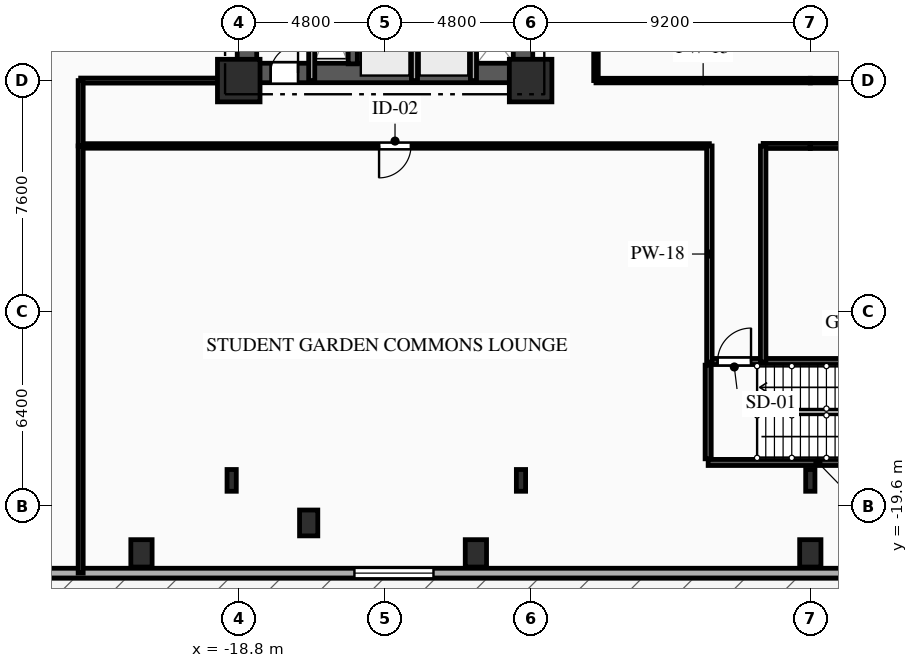
"""IFC4 building model, lengths in metres.
Left out: names, types, materials, properties, quantities, classifications, styles, units other than length and angle.
Written with IfcOpenShell. Run it as: python <this file> out.ifc"""

import sys

from ifc_helpers import new_model, si_unit, direction, frame, frame_2d, origin, origin_2d, place, context, subcontext, project, spatial, rectangle, i_section, extrude, element, fill, save


model = new_model("IFC4")
c1 = context("Model", 3, precision=1e-05, world=origin(), true_north=direction((0.0, 1.0)))
c2 = subcontext(c1, "Body", "Model", "MODEL_VIEW")
j1 = project(units=[si_unit("LENGTHUNIT", "METRE"), si_unit("PLANEANGLEUNIT", "RADIAN")], contexts=[c1])
p1 = place(None, origin())
s1 = spatial("IfcSite", under=j1, at=p1, CompositionType="ELEMENT")
p2 = place(p1, origin())
s2 = spatial("IfcBuilding", under=s1, at=p2, CompositionType="ELEMENT")
p3 = place(p2, frame((0.0, 0.0, 13.5)))
s3 = spatial("IfcBuildingStorey", under=s2, at=p3, CompositionType="ELEMENT", Elevation=13.5)
for number, where, z_axis, x_axis in (
    (1, (-18.8, -5.6, 0.0), (0.0, 0.0, 1.0), (1.0, 0.0, 0.0)),
    (2, (-9.2, -5.6, 0.0), (0.0, 0.0, 1.0), (1.0, 0.0, 0.0)),
):
    element("IfcColumn", number, at=place(p3, frame(where, z_axis=z_axis, x_axis=x_axis)), inside=s3, PredefinedType="COLUMN", context=c2, shape_type="SweptSolid", body=[
        extrude(rectangle(XDim=1.4, YDim=1.4, at=origin_2d()), origin(), (0.0, 0.0, 1.0), 4.5),
    ])
for number, where, z_axis, x_axis in (
    (3, (-22.0, -21.15, 0.0), (0.0, 0.0, 1.0), (1.0, 0.0, 0.0)),
    (4, (-11.0, -21.15, 0.0), (0.0, 0.0, 1.0), (1.0, 0.0, 0.0)),
    (5, (0.0, -21.15, 0.0), (0.0, 0.0, 1.0), (1.0, 0.0, 0.0)),
):
    element("IfcColumn", number, at=place(p3, frame(where, z_axis=z_axis, x_axis=x_axis)), inside=s3, PredefinedType="COLUMN", context=c2, shape_type="SweptSolid", body=[
        extrude(rectangle(XDim=0.7, YDim=0.9, at=origin_2d()), origin(), (0.0, 0.0, 1.0), 4.5),
    ])
p4 = place(p3, frame((-16.5, -20.15, 0.0), z_axis=(0.0, 0.0, 1.0), x_axis=(1.0, 0.0, 0.0)))
e6 = element("IfcColumn", 6, at=p4, inside=s3, PredefinedType="PILASTER", context=c2, shape_type="SweptSolid", body=[
    extrude(rectangle(XDim=0.6, YDim=0.85, at=origin_2d()), origin(), (0.0, 0.0, 1.0), 4.5),
])
for number, where, z_axis, x_axis in (
    (7, (-19.033, -18.75, 0.0), (0.0, 0.0, 1.0), (1.0, 0.0, 0.0)),
    (8, (-9.517, -18.75, 0.0), (0.0, 0.0, 1.0), (1.0, 0.0, 0.0)),
    (9, (0.0, -18.75, 0.0), (0.0, 0.0, 1.0), (1.0, 0.0, 0.0)),
):
    element("IfcColumn", number, at=place(p3, frame(where, z_axis=z_axis, x_axis=x_axis)), inside=s3, PredefinedType="COLUMN", context=c2, shape_type="SweptSolid", body=[
        extrude(i_section(OverallWidth=0.304, OverallDepth=0.716, WebThickness=0.021, FlangeThickness=0.04, FilletRadius=0.027, at=origin_2d()), origin(), (0.0, 0.0, 1.0), 4.5),
    ])
p5 = place(p3, frame((36.8, -21.8, 0.0), z_axis=(0.0, 0.0, 1.0), x_axis=(-1.0, 0.0, 0.0)))
e10 = element("IfcWall", 10, at=p5, inside=s3, PredefinedType="SOLIDWALL", context=c2, shape_type="SweptSolid", body=[
    extrude(rectangle(XDim=73.6, YDim=0.32, at=frame_2d((36.8, 0.0))), origin(), (0.0, 0.0, 1.0), 4.17),
])
p6 = place(p5, frame((0.75, 0.0, 0.0)))
e11 = element("IfcOpeningElement", 11, at=p6, cuts=e10, PredefinedType="OPENING", context=c2, shape_type="SweptSolid", body=[
    extrude(rectangle(XDim=1.5, YDim=2.2, at=frame_2d((0.75, 1.1))), frame((0.0, 0.17, 0.0), z_axis=(0.0, -1.0, 0.0), x_axis=(1.0, 0.0, 0.0)), (0.0, 0.0, 1.0), 0.34),
])
p7 = place(p5, frame((5.347, 0.0, 0.85)))
e12 = element("IfcOpeningElement", 12, at=p7, cuts=e10, PredefinedType="OPENING", context=c2, shape_type="SweptSolid", body=[
    extrude(rectangle(XDim=2.6, YDim=2.4, at=frame_2d((1.3, 1.2))), frame((0.0, 0.17, 0.0), z_axis=(0.0, -1.0, 0.0), x_axis=(1.0, 0.0, 0.0)), (0.0, 0.0, 1.0), 0.34),
])
p8 = place(p5, frame((29.293, 0.0, 0.85)))
e13 = element("IfcOpeningElement", 13, at=p8, cuts=e10, PredefinedType="OPENING", context=c2, shape_type="SweptSolid", body=[
    extrude(rectangle(XDim=2.6, YDim=2.4, at=frame_2d((1.3, 1.2))), frame((0.0, 0.17, 0.0), z_axis=(0.0, -1.0, 0.0), x_axis=(1.0, 0.0, 0.0)), (0.0, 0.0, 1.0), 0.34),
])
p9 = place(p5, frame((49.195, 0.0, 0.85)))
e14 = element("IfcOpeningElement", 14, at=p9, cuts=e10, PredefinedType="OPENING", context=c2, shape_type="SweptSolid", body=[
    extrude(rectangle(XDim=2.6, YDim=2.4, at=frame_2d((1.3, 1.2))), frame((0.0, 0.17, 0.0), z_axis=(0.0, -1.0, 0.0), x_axis=(1.0, 0.0, 0.0)), (0.0, 0.0, 1.0), 0.34),
])
p10 = place(p5, frame((65.733, 0.0, 0.85)))
e15 = element("IfcOpeningElement", 15, at=p10, cuts=e10, PredefinedType="OPENING", context=c2, shape_type="SweptSolid", body=[
    extrude(rectangle(XDim=2.6, YDim=2.4, at=frame_2d((1.3, 1.2))), frame((0.0, 0.17, 0.0), z_axis=(0.0, -1.0, 0.0), x_axis=(1.0, 0.0, 0.0)), (0.0, 0.0, 1.0), 0.34),
])
p11 = place(p3, frame((-18.8, -5.35, 0.0), z_axis=(0.0, 0.0, 1.0), x_axis=(1.0, 0.0, 0.0)))
e16 = element("IfcWall", 16, at=p11, inside=s3, PredefinedType="SHEAR", context=c2, shape_type="SweptSolid", body=[
    extrude(rectangle(XDim=9.6, YDim=0.64, at=frame_2d((4.8, 0.0))), origin(), (0.0, 0.0, 1.0), 4.17),
])
p12 = place(p11, frame((1.05, 0.0, 0.0)))
e17 = element("IfcOpeningElement", 17, at=p12, cuts=e16, PredefinedType="OPENING", context=c2, shape_type="SweptSolid", body=[
    extrude(rectangle(XDim=0.9, YDim=2.1, at=frame_2d((0.45, 1.05))), frame((0.0, 0.33, 0.0), z_axis=(0.0, -1.0, 0.0), x_axis=(1.0, 0.0, 0.0)), (0.0, 0.0, 1.0), 0.66),
])
p13 = place(p3, frame((-18.53, -5.05, 0.0), z_axis=(0.0, 0.0, 1.0), x_axis=(0.0, 1.0, 0.0)))
e18 = element("IfcWall", 18, at=p13, inside=s3, PredefinedType="SHEAR", context=c2, shape_type="SweptSolid", body=[
    extrude(rectangle(XDim=10.1, YDim=0.64, at=frame_2d((5.05, 0.0))), origin(), (0.0, 0.0, 1.0), 4.17),
])
p14 = place(p3, frame((-9.45, -5.05, 0.0), z_axis=(0.0, 0.0, 1.0), x_axis=(0.0, 1.0, 0.0)))
e19 = element("IfcWall", 19, at=p14, inside=s3, PredefinedType="SHEAR", context=c2, shape_type="SweptSolid", body=[
    extrude(rectangle(XDim=10.1, YDim=0.64, at=frame_2d((5.05, 0.0))), origin(), (0.0, 0.0, 1.0), 4.17),
])
p15 = place(p14, frame((7.15, 0.0, 0.0)))
e20 = element("IfcOpeningElement", 20, at=p15, cuts=e19, PredefinedType="OPENING", context=c2, shape_type="SweptSolid", body=[
    extrude(rectangle(XDim=0.9, YDim=2.1, at=frame_2d((0.45, 1.05))), frame((0.0, 0.33, 0.0), z_axis=(0.0, -1.0, 0.0), x_axis=(1.0, 0.0, 0.0)), (0.0, 0.0, 1.0), 0.66),
])
p16 = place(p14, frame((2.4, 0.0, 0.0)))
e21 = element("IfcOpeningElement", 21, at=p16, cuts=e19, PredefinedType="OPENING", context=c2, shape_type="SweptSolid", body=[
    extrude(rectangle(XDim=1.2, YDim=2.15, at=frame_2d((0.6, 1.075))), frame((0.0, 0.33, 0.0), z_axis=(0.0, -1.0, 0.0), x_axis=(1.0, 0.0, 0.0)), (0.0, 0.0, 1.0), 0.66),
])
p17 = place(p3, frame((-15.05, -5.05, 0.0), z_axis=(0.0, 0.0, 1.0), x_axis=(0.0, 1.0, 0.0)))
e22 = element("IfcWall", 22, at=p17, inside=s3, PredefinedType="SHEAR", context=c2, shape_type="SweptSolid", body=[
    extrude(rectangle(XDim=10.1, YDim=0.3, at=frame_2d((5.05, 0.0))), origin(), (0.0, 0.0, 1.0), 4.17),
])
p18 = place(p3, frame((-3.36, -14.84, 0.0), z_axis=(0.0, 0.0, 1.0), x_axis=(1.0, 0.0, 0.0)))
e23 = element("IfcWall", 23, at=p18, inside=s3, PredefinedType="SHEAR", context=c2, shape_type="SweptSolid", body=[
    extrude(rectangle(XDim=7.22, YDim=0.2, at=frame_2d((3.61, 0.0))), origin(), (0.0, 0.0, 1.0), 4.17),
])
p19 = place(p18, frame((0.31, 0.0, 0.0)))
e24 = element("IfcOpeningElement", 24, at=p19, cuts=e23, PredefinedType="OPENING", context=c2, shape_type="SweptSolid", body=[
    extrude(rectangle(XDim=1.1, YDim=2.15, at=frame_2d((0.55, 1.075))), frame((0.0, 0.11, 0.0), z_axis=(0.0, -1.0, 0.0), x_axis=(1.0, 0.0, 0.0)), (0.0, 0.0, 1.0), 0.22),
])
p20 = place(p3, frame((-3.36, -18.16, 0.0), z_axis=(0.0, 0.0, 1.0), x_axis=(1.0, 0.0, 0.0)))
e25 = element("IfcWall", 25, at=p20, inside=s3, PredefinedType="SHEAR", context=c2, shape_type="SweptSolid", body=[
    extrude(rectangle(XDim=7.22, YDim=0.2, at=frame_2d((3.61, 0.0))), origin(), (0.0, 0.0, 1.0), 4.17),
])
p21 = place(p3, frame((-3.36, -18.04, 0.0), z_axis=(0.0, 0.0, 1.0), x_axis=(0.0, 1.0, 0.0)))
e26 = element("IfcWall", 26, at=p21, inside=s3, PredefinedType="SHEAR", context=c2, shape_type="SweptSolid", body=[
    extrude(rectangle(XDim=3.08, YDim=0.2, at=frame_2d((1.54, 0.0))), origin(), (0.0, 0.0, 1.0), 4.17),
])
p22 = place(p3, frame((-16.4, -5.6, 0.0), z_axis=(0.0, 0.0, 1.0), x_axis=(0.0, 1.0, 0.0)))
e27 = element("IfcWall", 27, at=p22, inside=s3, PredefinedType="PARTITIONING", context=c2, shape_type="SweptSolid", body=[
    extrude(rectangle(XDim=3.49, YDim=0.2, at=frame_2d((1.745, 0.0))), origin(), (0.0, 0.0, 1.0), 4.17),
])
for number, where, z_axis, x_axis in (
    (28, (-13.02, -5.6, 0.0), (0.0, 0.0, 1.0), (0.0, 1.0, 0.0)),
    (29, (-11.08, -5.6, 0.0), (0.0, 0.0, 1.0), (0.0, 1.0, 0.0)),
):
    element("IfcWall", number, at=place(p3, frame(where, z_axis=z_axis, x_axis=x_axis)), inside=s3, PredefinedType="PARTITIONING", context=c2, shape_type="SweptSolid", body=[
        extrude(rectangle(XDim=2.25, YDim=0.2, at=frame_2d((1.125, 0.0))), origin(), (0.0, 0.0, 1.0), 4.17),
    ])
p23 = place(p3, frame((-3.32, -7.75, 0.0), z_axis=(0.0, 0.0, 1.0), x_axis=(-1.0, 0.0, 0.0)))
e30 = element("IfcWall", 30, at=p23, inside=s3, PredefinedType="PARTITIONING", context=c2, shape_type="SweptSolid", body=[
    extrude(rectangle(XDim=20.68, YDim=0.15, at=frame_2d((10.34, 0.0))), origin(), (0.0, 0.0, 1.0), 4.17),
])
p24 = place(p23, frame((9.815, 0.0, 0.0)))
e31 = element("IfcOpeningElement", 31, at=p24, cuts=e30, PredefinedType="OPENING", context=c2, shape_type="SweptSolid", body=[
    extrude(rectangle(XDim=1.05, YDim=2.15, at=frame_2d((0.525, 1.075))), frame((0.0, 0.085, 0.0), z_axis=(0.0, -1.0, 0.0), x_axis=(1.0, 0.0, 0.0)), (0.0, 0.0, 1.0), 0.17),
])
p25 = place(p3, frame((0.0, -7.75, 0.0), z_axis=(0.0, 0.0, 1.0), x_axis=(-1.0, 0.0, 0.0)))
e32 = element("IfcWall", 32, at=p25, inside=s3, PredefinedType="PARTITIONING", context=c2, shape_type="SweptSolid", body=[
    extrude(rectangle(XDim=1.55, YDim=0.165, at=frame_2d((0.775, 0.0))), origin(), (0.0, 0.0, 1.0), 4.17),
])
p26 = place(p3, frame((-24.0, -5.6, 0.0), z_axis=(0.0, 0.0, 1.0), x_axis=(1.0, 0.0, 0.0)))
e33 = element("IfcWall", 33, at=p26, inside=s3, PredefinedType="PARTITIONING", context=c2, shape_type="SweptSolid", body=[
    extrude(rectangle(XDim=5.2, YDim=0.165, at=frame_2d((2.6, 0.0))), origin(), (0.0, 0.0, 1.0), 4.17),
])
p27 = place(p3, frame((-24.0, -7.75, 0.0), z_axis=(0.0, 0.0, 1.0), x_axis=(0.0, 1.0, 0.0)))
e34 = element("IfcWall", 34, at=p27, inside=s3, PredefinedType="PARTITIONING", context=c2, shape_type="SweptSolid", body=[
    extrude(rectangle(XDim=2.15, YDim=0.165, at=frame_2d((1.075, 0.0))), origin(), (0.0, 0.0, 1.0), 4.17),
])
p28 = place(p3, frame((-7.05, -5.6, 0.0), z_axis=(0.0, 0.0, 1.0), x_axis=(1.0, 0.0, 0.0)))
e35 = element("IfcWall", 35, at=p28, inside=s3, PredefinedType="PARTITIONING", context=c2, shape_type="SweptSolid", body=[
    extrude(rectangle(XDim=7.05, YDim=0.15, at=frame_2d((3.525, 0.0))), origin(), (0.0, 0.0, 1.0), 3.655),
])
p29 = place(p3, frame((14.0, -7.75, 0.0), z_axis=(0.0, 0.0, 1.0), x_axis=(-1.0, 0.0, 0.0)))
e36 = element("IfcWall", 36, at=p29, inside=s3, PredefinedType="PARTITIONING", context=c2, shape_type="SweptSolid", body=[
    extrude(rectangle(XDim=14.0, YDim=0.165, at=frame_2d((7.0, 0.0))), origin(), (0.0, 0.0, 1.0), 4.17),
])
p30 = place(p29, frame((10.809, 0.0, 0.0)))
e37 = element("IfcOpeningElement", 37, at=p30, cuts=e36, PredefinedType="OPENING", context=c2, shape_type="SweptSolid", body=[
    extrude(rectangle(XDim=1.15, YDim=2.15, at=frame_2d((0.575, 1.075))), frame((0.0, 0.093, 0.0), z_axis=(0.0, -1.0, 0.0), x_axis=(1.0, 0.0, 0.0)), (0.0, 0.0, 1.0), 0.185),
])
p31 = place(p3, frame((0.0, -5.6, 0.0), z_axis=(0.0, 0.0, 1.0), x_axis=(1.0, 0.0, 0.0)))
e38 = element("IfcWall", 38, at=p31, inside=s3, PredefinedType="PARTITIONING", context=c2, shape_type="SweptSolid", body=[
    extrude(rectangle(XDim=7.05, YDim=0.15, at=frame_2d((3.525, 0.0))), origin(), (0.0, 0.0, 1.0), 3.655),
])
p32 = place(p3, frame((-7.05, 8.5, 0.0), z_axis=(0.0, 0.0, 1.0), x_axis=(0.0, -1.0, 0.0)))
e39 = element("IfcWall", 39, at=p32, inside=s3, PredefinedType="PARTITIONING", context=c2, shape_type="SweptSolid", body=[
    extrude(rectangle(XDim=14.1, YDim=0.15, at=frame_2d((7.05, 0.0))), origin(), (0.0, 0.0, 1.0), 4.17),
])
p33 = place(p32, frame((7.792, 0.0, 0.0)))
e40 = element("IfcOpeningElement", 40, at=p33, cuts=e39, PredefinedType="OPENING", context=c2, shape_type="SweptSolid", body=[
    extrude(rectangle(XDim=1.4, YDim=2.3, at=frame_2d((0.7, 1.15))), frame((0.0, 0.085, 0.0), z_axis=(0.0, -1.0, 0.0), x_axis=(1.0, 0.0, 0.0)), (0.0, 0.0, 1.0), 0.17),
])
for number, where, z_axis, x_axis in (
    (41, (-3.32, -14.86, 0.0), (0.0, 0.0, 1.0), (0.0, 1.0, 0.0)),
    (42, (-1.55, -7.75, 0.0), (0.0, 0.0, 1.0), (0.0, -1.0, 0.0)),
):
    element("IfcWall", number, at=place(p3, frame(where, z_axis=z_axis, x_axis=x_axis)), inside=s3, PredefinedType="PARTITIONING", context=c2, shape_type="SweptSolid", body=[
        extrude(rectangle(XDim=7.11, YDim=0.18, at=frame_2d((3.555, 0.0))), origin(), (0.0, 0.0, 1.0), 4.17),
    ])
p34 = place(p3, frame((-24.0, -21.8, 0.0), z_axis=(0.0, 0.0, 1.0), x_axis=(0.0, 1.0, 0.0)))
e43 = element("IfcWall", 43, at=p34, inside=s3, PredefinedType="PARTITIONING", context=c2, shape_type="SweptSolid", body=[
    extrude(rectangle(XDim=14.05, YDim=0.165, at=frame_2d((7.025, 0.0))), origin(), (0.0, 0.0, 1.0), 4.17),
])
p35 = place(p9, origin())
e44 = element("IfcWindow", 44, at=p35, inside=s3, PartitioningType="SINGLE_PANEL", PredefinedType="WINDOW", context=c2, shape_type="SweptSolid", body=[
    extrude(rectangle(XDim=2.6, YDim=2.4, at=frame_2d((1.3, 1.2))), frame((0.0, 0.03, 0.0), z_axis=(0.0, -1.0, 0.0), x_axis=(1.0, 0.0, 0.0)), (0.0, 0.0, 1.0), 0.06),
])
fill(e14, e44)
p36 = place(p12, origin())
e45 = element("IfcDoor", 45, at=p36, inside=s3, OperationType="SINGLE_SWING_RIGHT", PredefinedType="DOOR", context=c2, shape_type="SweptSolid", body=[
    extrude(rectangle(XDim=0.9, YDim=2.1, at=frame_2d((0.45, 1.05))), frame((0.0, 0.025, 0.0), z_axis=(0.0, -1.0, 0.0), x_axis=(1.0, 0.0, 0.0)), (0.0, 0.0, 1.0), 0.05),
])
fill(e17, e45)
p37 = place(p19, origin())
e46 = element("IfcDoor", 46, at=p37, inside=s3, OperationType="SINGLE_SWING_RIGHT", PredefinedType="DOOR", context=c2, shape_type="SweptSolid", body=[
    extrude(rectangle(XDim=1.1, YDim=2.15, at=frame_2d((0.55, 1.075))), frame((0.0, 0.025, 0.0), z_axis=(0.0, -1.0, 0.0), x_axis=(1.0, 0.0, 0.0)), (0.0, 0.0, 1.0), 0.05),
])
fill(e24, e46)
p38 = place(p24, origin())
e47 = element("IfcDoor", 47, at=p38, inside=s3, OperationType="SINGLE_SWING_RIGHT", PredefinedType="DOOR", context=c2, shape_type="SweptSolid", body=[
    extrude(rectangle(XDim=1.05, YDim=2.15, at=frame_2d((0.525, 1.075))), frame((0.0, 0.025, 0.0), z_axis=(0.0, -1.0, 0.0), x_axis=(1.0, 0.0, 0.0)), (0.0, 0.0, 1.0), 0.05),
])
fill(e31, e47)
save(model, sys.argv[1])
